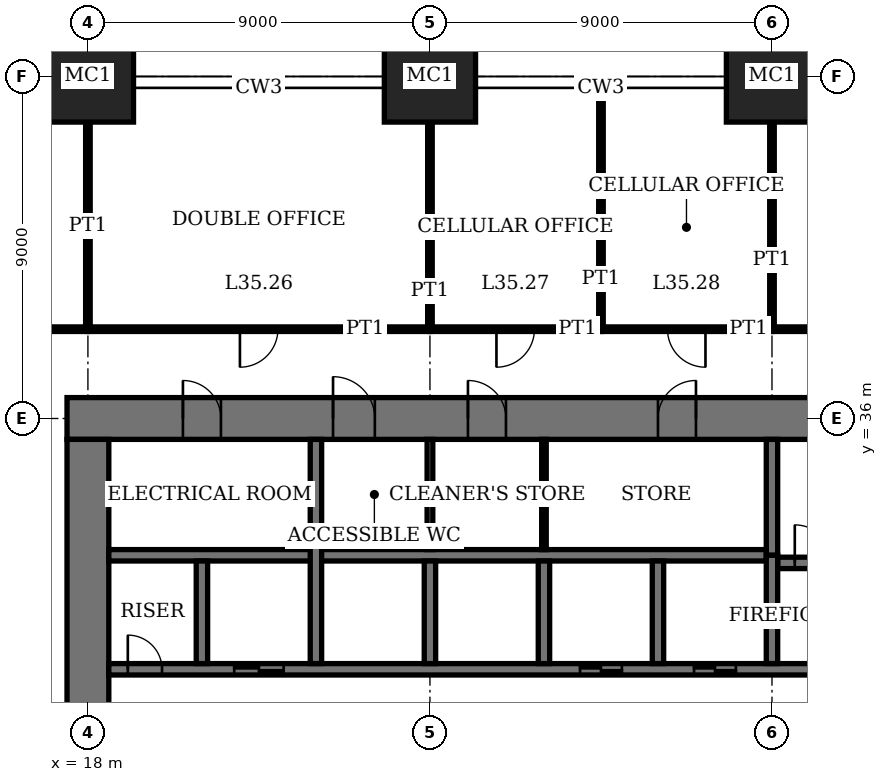
"""IFC4 building model, lengths in metres.
Left out: names, types, materials, properties, quantities, classifications, styles, units other than length and angle.
Written with IfcOpenShell. Run it as: python <this file> out.ifc"""

import sys

from ifc_helpers import new_model, si_unit, direction, frame, frame_2d, origin, origin_2d, place, context, subcontext, project, spatial, rectangle, extrude, element, fill, save


model = new_model("IFC4")
c1 = context("Model", 3, precision=1e-05, world=origin(), true_north=direction((0.0, 1.0)))
c2 = subcontext(c1, "Body", "Model", "MODEL_VIEW")
j1 = project(units=[si_unit("LENGTHUNIT", "METRE"), si_unit("PLANEANGLEUNIT", "RADIAN")], contexts=[c1])
p1 = place(None, origin())
s1 = spatial("IfcSite", under=j1, at=p1, CompositionType="ELEMENT")
p2 = place(p1, origin())
s2 = spatial("IfcBuilding", under=s1, at=p2, CompositionType="ELEMENT")
p3 = place(p2, frame((0.0, 0.0, 145.0)))
s3 = spatial("IfcBuildingStorey", under=s2, at=p3, CompositionType="ELEMENT", Elevation=145.0)
for number, where, z_axis, x_axis in (
    (1, (18.0, 45.0, 0.0), (0.0, 0.0, 1.0), (1.0, 0.0, 0.0)),
    (2, (27.0, 45.0, 0.0), (0.0, 0.0, 1.0), (1.0, 0.0, 0.0)),
    (3, (36.0, 45.0, 0.0), (0.0, 0.0, 1.0), (1.0, 0.0, 0.0)),
):
    element("IfcColumn", number, at=place(p3, frame(where, z_axis=z_axis, x_axis=x_axis)), inside=s3, PredefinedType="COLUMN", context=c2, shape_type="SweptSolid", body=[
        extrude(rectangle(XDim=2.4, YDim=2.4, at=origin_2d()), origin(), (0.0, 0.0, 1.0), 4.0),
    ])
p4 = place(p3, frame((45.55, 36.0, 0.0), z_axis=(0.0, 0.0, 1.0), x_axis=(-1.0, 0.0, 0.0)))
e4 = element("IfcWall", 4, at=p4, inside=s3, PredefinedType="SHEAR", context=c2, shape_type="SweptSolid", body=[
    extrude(rectangle(XDim=28.1, YDim=1.1, at=frame_2d((14.05, 0.0))), origin(), (0.0, 0.0, 1.0), 4.0),
])
p5 = place(p4, frame((11.55, 0.0, 0.0)))
e5 = element("IfcOpeningElement", 5, at=p5, cuts=e4, PredefinedType="OPENING", context=c2, shape_type="SweptSolid", body=[
    extrude(rectangle(XDim=1.0, YDim=2.4, at=frame_2d((0.5, 1.2))), frame((0.0, 0.56, 0.0), z_axis=(0.0, -1.0, 0.0), x_axis=(1.0, 0.0, 0.0)), (0.0, 0.0, 1.0), 1.12),
])
p6 = place(p4, frame((16.55, 0.0, 0.0)))
e6 = element("IfcOpeningElement", 6, at=p6, cuts=e4, PredefinedType="OPENING", context=c2, shape_type="SweptSolid", body=[
    extrude(rectangle(XDim=1.0, YDim=2.4, at=frame_2d((0.5, 1.2))), frame((0.0, 0.56, 0.0), z_axis=(0.0, -1.0, 0.0), x_axis=(1.0, 0.0, 0.0)), (0.0, 0.0, 1.0), 1.12),
])
p7 = place(p4, frame((20.0, 0.0, 0.0)))
e7 = element("IfcOpeningElement", 7, at=p7, cuts=e4, PredefinedType="OPENING", context=c2, shape_type="SweptSolid", body=[
    extrude(rectangle(XDim=1.1, YDim=2.4, at=frame_2d((0.55, 1.2))), frame((0.0, 0.56, 0.0), z_axis=(0.0, -1.0, 0.0), x_axis=(1.0, 0.0, 0.0)), (0.0, 0.0, 1.0), 1.12),
])
p8 = place(p4, frame((24.05, 0.0, 0.0)))
e8 = element("IfcOpeningElement", 8, at=p8, cuts=e4, PredefinedType="OPENING", context=c2, shape_type="SweptSolid", body=[
    extrude(rectangle(XDim=1.0, YDim=2.4, at=frame_2d((0.5, 1.2))), frame((0.0, 0.56, 0.0), z_axis=(0.0, -1.0, 0.0), x_axis=(1.0, 0.0, 0.0)), (0.0, 0.0, 1.0), 1.12),
])
p9 = place(p3, frame((18.0, 35.45, 0.0), z_axis=(0.0, 0.0, 1.0), x_axis=(0.0, -1.0, 0.0)))
e9 = element("IfcWall", 9, at=p9, inside=s3, PredefinedType="SHEAR", context=c2, shape_type="SweptSolid", body=[
    extrude(rectangle(XDim=16.9, YDim=1.1, at=frame_2d((8.45, 0.0))), origin(), (0.0, 0.0, 1.0), 4.0),
])
p10 = place(p9, frame((8.45, 0.0, 0.0)))
e10 = element("IfcOpeningElement", 10, at=p10, cuts=e9, PredefinedType="OPENING", context=c2, shape_type="SweptSolid", body=[
    extrude(rectangle(XDim=1.8, YDim=2.4, at=frame_2d((0.9, 1.2))), frame((0.0, 0.56, 0.0), z_axis=(0.0, -1.0, 0.0), x_axis=(1.0, 0.0, 0.0)), (0.0, 0.0, 1.0), 1.12),
])
p11 = place(p3, frame((36.15, 32.2, 0.0), z_axis=(0.0, 0.0, 1.0), x_axis=(1.0, 0.0, 0.0)))
e11 = element("IfcWall", 11, at=p11, inside=s3, PredefinedType="SHEAR", context=c2, shape_type="SweptSolid", body=[
    extrude(rectangle(XDim=8.3, YDim=0.3, at=frame_2d((4.15, 0.0))), origin(), (0.0, 0.0, 1.0), 4.0),
])
p12 = place(p11, frame((0.45, 0.0, 0.0)))
e12 = element("IfcOpeningElement", 12, at=p12, cuts=e11, PredefinedType="OPENING", context=c2, shape_type="SweptSolid", body=[
    extrude(rectangle(XDim=1.0, YDim=2.4, at=frame_2d((0.5, 1.2))), frame((0.0, 0.16, 0.0), z_axis=(0.0, -1.0, 0.0), x_axis=(1.0, 0.0, 0.0)), (0.0, 0.0, 1.0), 0.32),
])
p13 = place(p3, frame((36.0, 32.4, 0.0), z_axis=(0.0, 0.0, 1.0), x_axis=(0.0, 1.0, 0.0)))
e13 = element("IfcWall", 13, at=p13, inside=s3, PredefinedType="SHEAR", context=c2, shape_type="SweptSolid", body=[
    extrude(rectangle(XDim=3.05, YDim=0.3, at=frame_2d((1.525, 0.0))), origin(), (0.0, 0.0, 1.0), 4.0),
])
p14 = place(p3, frame((18.55, 29.4, 0.0), z_axis=(0.0, 0.0, 1.0), x_axis=(1.0, 0.0, 0.0)))
e14 = element("IfcWall", 14, at=p14, inside=s3, PredefinedType="SHEAR", context=c2, shape_type="SweptSolid", body=[
    extrude(rectangle(XDim=25.9, YDim=0.3, at=frame_2d((12.95, 0.0))), origin(), (0.0, 0.0, 1.0), 4.0),
])
p15 = place(p14, frame((19.95, 0.0, 0.0)))
e15 = element("IfcOpeningElement", 15, at=p15, cuts=e14, PredefinedType="OPENING", context=c2, shape_type="SweptSolid", body=[
    extrude(rectangle(XDim=1.0, YDim=2.4, at=frame_2d((0.5, 1.2))), frame((0.0, 0.16, 0.0), z_axis=(0.0, -1.0, 0.0), x_axis=(1.0, 0.0, 0.0)), (0.0, 0.0, 1.0), 0.32),
])
p16 = place(p14, frame((0.5, 0.0, 0.0)))
e16 = element("IfcOpeningElement", 16, at=p16, cuts=e14, PredefinedType="OPENING", context=c2, shape_type="SweptSolid", body=[
    extrude(rectangle(XDim=0.9, YDim=2.1, at=frame_2d((0.45, 1.05))), frame((0.0, 0.16, 0.0), z_axis=(0.0, -1.0, 0.0), x_axis=(1.0, 0.0, 0.0)), (0.0, 0.0, 1.0), 0.32),
])
p17 = place(p14, frame((15.4, 0.0, 0.0)))
e17 = element("IfcOpeningElement", 17, at=p17, cuts=e14, PredefinedType="OPENING", context=c2, shape_type="SweptSolid", body=[
    extrude(rectangle(XDim=1.1, YDim=2.4, at=frame_2d((0.55, 1.2))), frame((0.0, 0.16, 0.0), z_axis=(0.0, -1.0, 0.0), x_axis=(1.0, 0.0, 0.0)), (0.0, 0.0, 1.0), 0.32),
])
p18 = place(p14, frame((12.4, 0.0, 0.0)))
e18 = element("IfcOpeningElement", 18, at=p18, cuts=e14, PredefinedType="OPENING", context=c2, shape_type="SweptSolid", body=[
    extrude(rectangle(XDim=1.1, YDim=2.4, at=frame_2d((0.55, 1.2))), frame((0.0, 0.16, 0.0), z_axis=(0.0, -1.0, 0.0), x_axis=(1.0, 0.0, 0.0)), (0.0, 0.0, 1.0), 0.32),
])
p19 = place(p14, frame((3.3, 0.0, 0.0)))
e19 = element("IfcOpeningElement", 19, at=p19, cuts=e14, PredefinedType="OPENING", context=c2, shape_type="SweptSolid", body=[
    extrude(rectangle(XDim=1.3, YDim=2.4, at=frame_2d((0.65, 1.2))), frame((0.0, 0.16, 0.0), z_axis=(0.0, -1.0, 0.0), x_axis=(1.0, 0.0, 0.0)), (0.0, 0.0, 1.0), 0.32),
])
p20 = place(p3, frame((18.55, 32.4, 0.0), z_axis=(0.0, 0.0, 1.0), x_axis=(1.0, 0.0, 0.0)))
e20 = element("IfcWall", 20, at=p20, inside=s3, PredefinedType="SHEAR", context=c2, shape_type="SweptSolid", body=[
    extrude(rectangle(XDim=17.3, YDim=0.3, at=frame_2d((8.65, 0.0))), origin(), (0.0, 0.0, 1.0), 4.0),
])
for number, where, z_axis, x_axis in (
    (21, (33.0, 29.55, 0.0), (0.0, 0.0, 1.0), (0.0, 1.0, 0.0)),
    (22, (30.0, 29.55, 0.0), (0.0, 0.0, 1.0), (0.0, 1.0, 0.0)),
    (23, (27.0, 29.55, 0.0), (0.0, 0.0, 1.0), (0.0, 1.0, 0.0)),
):
    element("IfcWall", number, at=place(p3, frame(where, z_axis=z_axis, x_axis=x_axis)), inside=s3, PredefinedType="SHEAR", context=c2, shape_type="SweptSolid", body=[
        extrude(rectangle(XDim=2.7, YDim=0.3, at=frame_2d((1.35, 0.0))), origin(), (0.0, 0.0, 1.0), 4.0),
    ])
p21 = place(p3, frame((24.0, 29.55, 0.0), z_axis=(0.0, 0.0, 1.0), x_axis=(0.0, 1.0, 0.0)))
e24 = element("IfcWall", 24, at=p21, inside=s3, PredefinedType="SHEAR", context=c2, shape_type="SweptSolid", body=[
    extrude(rectangle(XDim=5.9, YDim=0.3, at=frame_2d((2.95, 0.0))), origin(), (0.0, 0.0, 1.0), 4.0),
])
p22 = place(p3, frame((21.0, 29.55, 0.0), z_axis=(0.0, 0.0, 1.0), x_axis=(0.0, 1.0, 0.0)))
e25 = element("IfcWall", 25, at=p22, inside=s3, PredefinedType="SHEAR", context=c2, shape_type="SweptSolid", body=[
    extrude(rectangle(XDim=2.7, YDim=0.3, at=frame_2d((1.35, 0.0))), origin(), (0.0, 0.0, 1.0), 4.0),
])
p23 = place(p3, frame((36.0, 29.55, 0.0), z_axis=(0.0, 0.0, 1.0), x_axis=(0.0, 1.0, 0.0)))
e26 = element("IfcWall", 26, at=p23, inside=s3, PredefinedType="SHEAR", context=c2, shape_type="SweptSolid", body=[
    extrude(rectangle(XDim=2.85, YDim=0.3, at=frame_2d((1.425, 0.0))), origin(), (0.0, 0.0, 1.0), 4.0),
])
p24 = place(p3, frame((9.0, 38.35, 0.0), z_axis=(0.0, 0.0, 1.0), x_axis=(1.0, 0.0, 0.0)))
e27 = element("IfcWall", 27, at=p24, inside=s3, PredefinedType="PARTITIONING", context=c2, shape_type="SweptSolid", body=[
    extrude(rectangle(XDim=9.0, YDim=0.12, at=frame_2d((4.5, 0.0))), origin(), (0.0, 0.0, 1.0), 3.75),
])
p25 = place(p24, frame((4.0, 0.0, 0.0)))
e28 = element("IfcOpeningElement", 28, at=p25, cuts=e27, PredefinedType="OPENING", context=c2, shape_type="SweptSolid", body=[
    extrude(rectangle(XDim=1.0, YDim=2.4, at=frame_2d((0.5, 1.2))), frame((0.0, 0.07, 0.0), z_axis=(0.0, -1.0, 0.0), x_axis=(1.0, 0.0, 0.0)), (0.0, 0.0, 1.0), 0.14),
])
p26 = place(p3, frame((18.0, 38.35, 0.0), z_axis=(0.0, 0.0, 1.0), x_axis=(1.0, 0.0, 0.0)))
e29 = element("IfcWall", 29, at=p26, inside=s3, PredefinedType="PARTITIONING", context=c2, shape_type="SweptSolid", body=[
    extrude(rectangle(XDim=9.0, YDim=0.12, at=frame_2d((4.5, 0.0))), origin(), (0.0, 0.0, 1.0), 3.75),
])
p27 = place(p26, frame((4.0, 0.0, 0.0)))
e30 = element("IfcOpeningElement", 30, at=p27, cuts=e29, PredefinedType="OPENING", context=c2, shape_type="SweptSolid", body=[
    extrude(rectangle(XDim=1.0, YDim=2.4, at=frame_2d((0.5, 1.2))), frame((0.0, 0.07, 0.0), z_axis=(0.0, -1.0, 0.0), x_axis=(1.0, 0.0, 0.0)), (0.0, 0.0, 1.0), 0.14),
])
p28 = place(p3, frame((27.0, 38.35, 0.0), z_axis=(0.0, 0.0, 1.0), x_axis=(1.0, 0.0, 0.0)))
e31 = element("IfcWall", 31, at=p28, inside=s3, PredefinedType="PARTITIONING", context=c2, shape_type="SweptSolid", body=[
    extrude(rectangle(XDim=4.5, YDim=0.12, at=frame_2d((2.25, 0.0))), origin(), (0.0, 0.0, 1.0), 3.75),
])
p29 = place(p28, frame((1.75, 0.0, 0.0)))
e32 = element("IfcOpeningElement", 32, at=p29, cuts=e31, PredefinedType="OPENING", context=c2, shape_type="SweptSolid", body=[
    extrude(rectangle(XDim=1.0, YDim=2.4, at=frame_2d((0.5, 1.2))), frame((0.0, 0.07, 0.0), z_axis=(0.0, -1.0, 0.0), x_axis=(1.0, 0.0, 0.0)), (0.0, 0.0, 1.0), 0.14),
])
p30 = place(p3, frame((31.5, 38.35, 0.0), z_axis=(0.0, 0.0, 1.0), x_axis=(1.0, 0.0, 0.0)))
e33 = element("IfcWall", 33, at=p30, inside=s3, PredefinedType="PARTITIONING", context=c2, shape_type="SweptSolid", body=[
    extrude(rectangle(XDim=4.5, YDim=0.12, at=frame_2d((2.25, 0.0))), origin(), (0.0, 0.0, 1.0), 3.75),
])
p31 = place(p30, frame((1.75, 0.0, 0.0)))
e34 = element("IfcOpeningElement", 34, at=p31, cuts=e33, PredefinedType="OPENING", context=c2, shape_type="SweptSolid", body=[
    extrude(rectangle(XDim=1.0, YDim=2.4, at=frame_2d((0.5, 1.2))), frame((0.0, 0.07, 0.0), z_axis=(0.0, -1.0, 0.0), x_axis=(1.0, 0.0, 0.0)), (0.0, 0.0, 1.0), 0.14),
])
p32 = place(p3, frame((36.0, 38.35, 0.0), z_axis=(0.0, 0.0, 1.0), x_axis=(1.0, 0.0, 0.0)))
e35 = element("IfcWall", 35, at=p32, inside=s3, PredefinedType="PARTITIONING", context=c2, shape_type="SweptSolid", body=[
    extrude(rectangle(XDim=9.0, YDim=0.12, at=frame_2d((4.5, 0.0))), origin(), (0.0, 0.0, 1.0), 3.75),
])
p33 = place(p32, frame((4.0, 0.0, 0.0)))
e36 = element("IfcOpeningElement", 36, at=p33, cuts=e35, PredefinedType="OPENING", context=c2, shape_type="SweptSolid", body=[
    extrude(rectangle(XDim=1.0, YDim=2.4, at=frame_2d((0.5, 1.2))), frame((0.0, 0.07, 0.0), z_axis=(0.0, -1.0, 0.0), x_axis=(1.0, 0.0, 0.0)), (0.0, 0.0, 1.0), 0.14),
])
for number, where, z_axis, x_axis in (
    (37, (18.0, 38.35, 0.0), (0.0, 0.0, 1.0), (0.0, 1.0, 0.0)),
    (38, (27.0, 38.35, 0.0), (0.0, 0.0, 1.0), (0.0, 1.0, 0.0)),
):
    element("IfcWall", number, at=place(p3, frame(where, z_axis=z_axis, x_axis=x_axis)), inside=s3, PredefinedType="PARTITIONING", context=c2, shape_type="SweptSolid", body=[
        extrude(rectangle(XDim=5.45, YDim=0.12, at=frame_2d((2.725, 0.0))), origin(), (0.0, 0.0, 1.0), 3.05),
    ])
p34 = place(p3, frame((31.5, 38.35, 0.0), z_axis=(0.0, 0.0, 1.0), x_axis=(0.0, 1.0, 0.0)))
e39 = element("IfcWall", 39, at=p34, inside=s3, PredefinedType="PARTITIONING", context=c2, shape_type="SweptSolid", body=[
    extrude(rectangle(XDim=6.34, YDim=0.12, at=frame_2d((3.17, 0.0))), origin(), (0.0, 0.0, 1.0), 3.75),
])
p35 = place(p3, frame((36.0, 38.35, 0.0), z_axis=(0.0, 0.0, 1.0), x_axis=(0.0, 1.0, 0.0)))
e40 = element("IfcWall", 40, at=p35, inside=s3, PredefinedType="PARTITIONING", context=c2, shape_type="SweptSolid", body=[
    extrude(rectangle(XDim=5.45, YDim=0.12, at=frame_2d((2.725, 0.0))), origin(), (0.0, 0.0, 1.0), 3.05),
])
p36 = place(p3, frame((30.0, 32.55, 0.0), z_axis=(0.0, 0.0, 1.0), x_axis=(0.0, 1.0, 0.0)))
e41 = element("IfcWall", 41, at=p36, inside=s3, PredefinedType="PARTITIONING", context=c2, shape_type="SweptSolid", body=[
    extrude(rectangle(XDim=2.9, YDim=0.12, at=frame_2d((1.45, 0.0))), origin(), (0.0, 0.0, 1.0), 3.75),
])
p37 = place(p3, frame((27.0, 32.55, 0.0), z_axis=(0.0, 0.0, 1.0), x_axis=(0.0, 1.0, 0.0)))
e42 = element("IfcWall", 42, at=p37, inside=s3, PredefinedType="PARTITIONING", context=c2, shape_type="SweptSolid", body=[
    extrude(rectangle(XDim=2.9, YDim=0.15, at=frame_2d((1.45, 0.0))), origin(), (0.0, 0.0, 1.0), 3.75),
])
p38 = place(p5, origin())
e43 = element("IfcDoor", 43, at=p38, inside=s3, OperationType="SINGLE_SWING_LEFT", PredefinedType="DOOR", context=c2, shape_type="SweptSolid", body=[
    extrude(rectangle(XDim=1.0, YDim=2.4, at=frame_2d((0.5, 1.2))), frame((0.0, 0.025, 0.0), z_axis=(0.0, -1.0, 0.0), x_axis=(1.0, 0.0, 0.0)), (0.0, 0.0, 1.0), 0.05),
    extrude(rectangle(XDim=0.04, YDim=2.4, at=frame_2d((0.02, 1.2))), frame((0.0, 0.4, 0.0), z_axis=(0.0, -1.0, 0.0), x_axis=(1.0, 0.0, 0.0)), (0.0, 0.0, 1.0), 0.8),
    extrude(rectangle(XDim=0.04, YDim=2.4, at=frame_2d((0.98, 1.2))), frame((0.0, 0.4, 0.0), z_axis=(0.0, -1.0, 0.0), x_axis=(1.0, 0.0, 0.0)), (0.0, 0.0, 1.0), 0.8),
    extrude(rectangle(XDim=1.0, YDim=0.04, at=frame_2d((0.5, 2.38))), frame((0.0, 0.4, 0.0), z_axis=(0.0, -1.0, 0.0), x_axis=(1.0, 0.0, 0.0)), (0.0, 0.0, 1.0), 0.8),
])
fill(e5, e43)
p39 = place(p6, origin())
e44 = element("IfcDoor", 44, at=p39, inside=s3, OperationType="SINGLE_SWING_RIGHT", PredefinedType="DOOR", context=c2, shape_type="SweptSolid", body=[
    extrude(rectangle(XDim=1.0, YDim=2.4, at=frame_2d((0.5, 1.2))), frame((0.0, 0.025, 0.0), z_axis=(0.0, -1.0, 0.0), x_axis=(1.0, 0.0, 0.0)), (0.0, 0.0, 1.0), 0.05),
    extrude(rectangle(XDim=0.04, YDim=2.4, at=frame_2d((0.02, 1.2))), frame((0.0, 0.4, 0.0), z_axis=(0.0, -1.0, 0.0), x_axis=(1.0, 0.0, 0.0)), (0.0, 0.0, 1.0), 0.8),
    extrude(rectangle(XDim=0.04, YDim=2.4, at=frame_2d((0.98, 1.2))), frame((0.0, 0.4, 0.0), z_axis=(0.0, -1.0, 0.0), x_axis=(1.0, 0.0, 0.0)), (0.0, 0.0, 1.0), 0.8),
    extrude(rectangle(XDim=1.0, YDim=0.04, at=frame_2d((0.5, 2.38))), frame((0.0, 0.4, 0.0), z_axis=(0.0, -1.0, 0.0), x_axis=(1.0, 0.0, 0.0)), (0.0, 0.0, 1.0), 0.8),
])
fill(e6, e44)
p40 = place(p7, origin())
e45 = element("IfcDoor", 45, at=p40, inside=s3, OperationType="SINGLE_SWING_RIGHT", PredefinedType="DOOR", context=c2, shape_type="SweptSolid", body=[
    extrude(rectangle(XDim=1.1, YDim=2.4, at=frame_2d((0.55, 1.2))), frame((0.0, 0.025, 0.0), z_axis=(0.0, -1.0, 0.0), x_axis=(1.0, 0.0, 0.0)), (0.0, 0.0, 1.0), 0.05),
    extrude(rectangle(XDim=0.04, YDim=2.4, at=frame_2d((0.02, 1.2))), frame((0.0, 0.44, 0.0), z_axis=(0.0, -1.0, 0.0), x_axis=(1.0, 0.0, 0.0)), (0.0, 0.0, 1.0), 0.88),
    extrude(rectangle(XDim=0.04, YDim=2.4, at=frame_2d((1.08, 1.2))), frame((0.0, 0.44, 0.0), z_axis=(0.0, -1.0, 0.0), x_axis=(1.0, 0.0, 0.0)), (0.0, 0.0, 1.0), 0.88),
    extrude(rectangle(XDim=1.1, YDim=0.04, at=frame_2d((0.55, 2.38))), frame((0.0, 0.44, 0.0), z_axis=(0.0, -1.0, 0.0), x_axis=(1.0, 0.0, 0.0)), (0.0, 0.0, 1.0), 0.88),
])
fill(e7, e45)
p41 = place(p8, origin())
e46 = element("IfcDoor", 46, at=p41, inside=s3, OperationType="SINGLE_SWING_RIGHT", PredefinedType="DOOR", context=c2, shape_type="SweptSolid", body=[
    extrude(rectangle(XDim=1.0, YDim=2.4, at=frame_2d((0.5, 1.2))), frame((0.0, 0.025, 0.0), z_axis=(0.0, -1.0, 0.0), x_axis=(1.0, 0.0, 0.0)), (0.0, 0.0, 1.0), 0.05),
    extrude(rectangle(XDim=0.04, YDim=2.4, at=frame_2d((0.02, 1.2))), frame((0.0, 0.4, 0.0), z_axis=(0.0, -1.0, 0.0), x_axis=(1.0, 0.0, 0.0)), (0.0, 0.0, 1.0), 0.8),
    extrude(rectangle(XDim=0.04, YDim=2.4, at=frame_2d((0.98, 1.2))), frame((0.0, 0.4, 0.0), z_axis=(0.0, -1.0, 0.0), x_axis=(1.0, 0.0, 0.0)), (0.0, 0.0, 1.0), 0.8),
    extrude(rectangle(XDim=1.0, YDim=0.04, at=frame_2d((0.5, 2.38))), frame((0.0, 0.4, 0.0), z_axis=(0.0, -1.0, 0.0), x_axis=(1.0, 0.0, 0.0)), (0.0, 0.0, 1.0), 0.8),
])
fill(e8, e46)
p42 = place(p12, origin())
e47 = element("IfcDoor", 47, at=p42, inside=s3, OperationType="SINGLE_SWING_RIGHT", PredefinedType="DOOR", context=c2, shape_type="SweptSolid", body=[
    extrude(rectangle(XDim=1.0, YDim=2.4, at=frame_2d((0.5, 1.2))), frame((0.0, 0.03, 0.0), z_axis=(0.0, -1.0, 0.0), x_axis=(1.0, 0.0, 0.0)), (0.0, 0.0, 1.0), 0.06),
])
fill(e12, e47)
p43 = place(p16, origin())
e48 = element("IfcDoor", 48, at=p43, inside=s3, OperationType="SINGLE_SWING_RIGHT", PredefinedType="DOOR", context=c2, shape_type="SweptSolid", body=[
    extrude(rectangle(XDim=0.9, YDim=2.1, at=frame_2d((0.45, 1.05))), frame((0.0, 0.03, 0.0), z_axis=(0.0, -1.0, 0.0), x_axis=(1.0, 0.0, 0.0)), (0.0, 0.0, 1.0), 0.06),
])
fill(e16, e48)
p44 = place(p27, origin())
e49 = element("IfcDoor", 49, at=p44, inside=s3, OperationType="SINGLE_SWING_LEFT", PredefinedType="DOOR", context=c2, shape_type="SweptSolid", body=[
    extrude(rectangle(XDim=1.0, YDim=2.4, at=frame_2d((0.5, 1.2))), frame((0.0, 0.025, 0.0), z_axis=(0.0, -1.0, 0.0), x_axis=(1.0, 0.0, 0.0)), (0.0, 0.0, 1.0), 0.05),
])
fill(e30, e49)
p45 = place(p29, origin())
e50 = element("IfcDoor", 50, at=p45, inside=s3, OperationType="SINGLE_SWING_LEFT", PredefinedType="DOOR", context=c2, shape_type="SweptSolid", body=[
    extrude(rectangle(XDim=1.0, YDim=2.4, at=frame_2d((0.5, 1.2))), frame((0.0, 0.025, 0.0), z_axis=(0.0, -1.0, 0.0), x_axis=(1.0, 0.0, 0.0)), (0.0, 0.0, 1.0), 0.05),
])
fill(e32, e50)
p46 = place(p31, origin())
e51 = element("IfcDoor", 51, at=p46, inside=s3, OperationType="SINGLE_SWING_RIGHT", PredefinedType="DOOR", context=c2, shape_type="SweptSolid", body=[
    extrude(rectangle(XDim=1.0, YDim=2.4, at=frame_2d((0.5, 1.2))), frame((0.0, 0.025, 0.0), z_axis=(0.0, -1.0, 0.0), x_axis=(1.0, 0.0, 0.0)), (0.0, 0.0, 1.0), 0.05),
])
fill(e34, e51)
p47 = place(p17, origin())
e52 = element("IfcDoor", 52, at=p47, inside=s3, OperationType="DOUBLE_DOOR_SLIDING", PredefinedType="DOOR", context=c2, shape_type="SweptSolid", body=[
    extrude(rectangle(XDim=1.1, YDim=2.4, at=frame_2d((0.55, 1.2))), frame((0.0, 0.02, 0.0), z_axis=(0.0, -1.0, 0.0), x_axis=(1.0, 0.0, 0.0)), (0.0, 0.0, 1.0), 0.04),
])
fill(e17, e52)
p48 = place(p18, origin())
e53 = element("IfcDoor", 53, at=p48, inside=s3, OperationType="DOUBLE_DOOR_SLIDING", PredefinedType="DOOR", context=c2, shape_type="SweptSolid", body=[
    extrude(rectangle(XDim=1.1, YDim=2.4, at=frame_2d((0.55, 1.2))), frame((0.0, 0.02, 0.0), z_axis=(0.0, -1.0, 0.0), x_axis=(1.0, 0.0, 0.0)), (0.0, 0.0, 1.0), 0.04),
])
fill(e18, e53)
p49 = place(p19, origin())
e54 = element("IfcDoor", 54, at=p49, inside=s3, OperationType="DOUBLE_DOOR_SLIDING", PredefinedType="DOOR", context=c2, shape_type="SweptSolid", body=[
    extrude(rectangle(XDim=1.3, YDim=2.4, at=frame_2d((0.65, 1.2))), frame((0.0, 0.02, 0.0), z_axis=(0.0, -1.0, 0.0), x_axis=(1.0, 0.0, 0.0)), (0.0, 0.0, 1.0), 0.04),
])
fill(e19, e54)
save(model, sys.argv[1])
